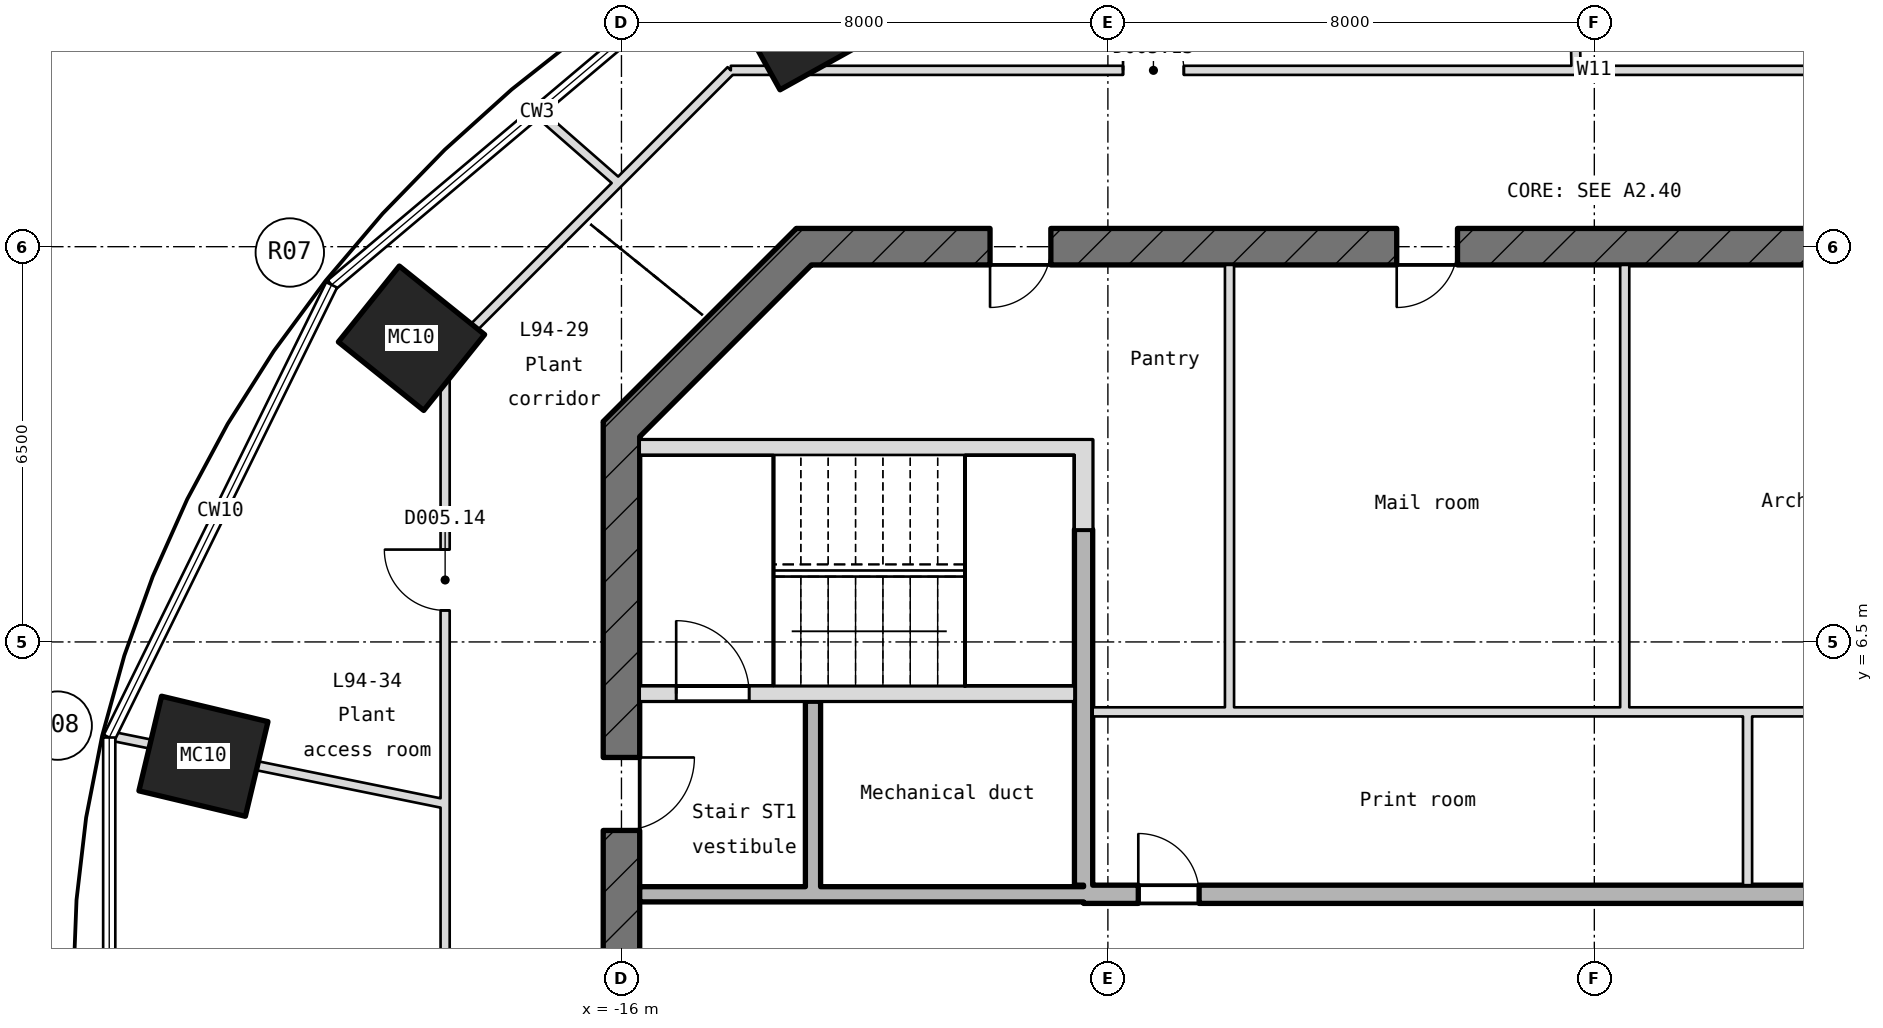
"""IFC4 building model, lengths in metres.
Left out: names, types, materials, properties, quantities, classifications, styles, units other than length and angle.
Written with IfcOpenShell. Run it as: python <this file> out.ifc"""

import sys

from ifc_helpers import new_model, si_unit, direction, frame, frame_2d, origin, origin_2d, place, context, subcontext, project, spatial, rectangle, hollow_rectangle, extrude, element, fill, save


model = new_model("IFC4")
c1 = context("Model", 3, precision=1e-05, world=origin(), true_north=direction((0.0, 1.0)))
c2 = subcontext(c1, "Body", "Model", "MODEL_VIEW")
j1 = project(units=[si_unit("LENGTHUNIT", "METRE"), si_unit("PLANEANGLEUNIT", "RADIAN")], contexts=[c1])
p1 = place(None, origin())
s1 = spatial("IfcSite", under=j1, at=p1, CompositionType="ELEMENT")
p2 = place(p1, origin())
s2 = spatial("IfcBuilding", under=s1, at=p2, CompositionType="ELEMENT")
p3 = place(p2, frame((0.0, 0.0, 418.55)))
s3 = spatial("IfcBuildingStorey", under=s2, at=p3, CompositionType="ELEMENT", Elevation=418.55)
for number, where, z_axis, x_axis in (
    (1, (-13.131, 16.755, -0.2), (0.0, 0.0, 1.0), (0.874, 0.486, 0.0)),
    (2, (-19.453, 11.494, -0.2), (0.0, 0.0, 1.0), (0.626, 0.78, 0.0)),
    (3, (-22.875, 4.62, -0.2), (0.0, 0.0, 1.0), (0.232, 0.973, 0.0)),
):
    element("IfcColumn", number, at=place(p3, frame(where, z_axis=z_axis, x_axis=x_axis)), inside=s3, PredefinedType="COLUMN", context=c2, shape_type="SweptSolid", body=[
        extrude(hollow_rectangle(XDim=1.6, YDim=1.8, WallThickness=0.045, at=origin_2d()), origin(), (0.0, 0.0, 1.0), 4.9),
    ])
p4 = place(p3, frame((13.124, 13.0, -0.2), z_axis=(0.0, 0.0, 1.0), x_axis=(-1.0, 0.0, 0.0)))
e4 = element("IfcWall", 4, at=p4, inside=s3, PredefinedType="SHEAR", context=c2, shape_type="SweptSolid", body=[
    extrude(rectangle(XDim=26.249, YDim=0.6, at=frame_2d((13.124, 0.0))), origin(), (0.0, 0.0, 1.0), 4.9),
])
p5 = place(p4, frame((22.062, 0.0, 0.2)))
e5 = element("IfcOpeningElement", 5, at=p5, cuts=e4, PredefinedType="OPENING", context=c2, shape_type="SweptSolid", body=[
    extrude(rectangle(XDim=1.0, YDim=2.1, at=frame_2d((0.5, 1.05))), frame((0.0, 0.31, 0.0), z_axis=(0.0, -1.0, 0.0), x_axis=(1.0, 0.0, 0.0)), (0.0, 0.0, 1.0), 0.62),
])
p6 = place(p4, frame((15.374, 0.0, 0.2)))
e6 = element("IfcOpeningElement", 6, at=p6, cuts=e4, PredefinedType="OPENING", context=c2, shape_type="SweptSolid", body=[
    extrude(rectangle(XDim=1.0, YDim=2.1, at=frame_2d((0.5, 1.05))), frame((0.0, 0.31, 0.0), z_axis=(0.0, -1.0, 0.0), x_axis=(1.0, 0.0, 0.0)), (0.0, 0.0, 1.0), 0.62),
])
p7 = place(p4, frame((7.874, 0.0, 0.2)))
e7 = element("IfcOpeningElement", 7, at=p7, cuts=e4, PredefinedType="OPENING", context=c2, shape_type="SweptSolid", body=[
    extrude(rectangle(XDim=1.0, YDim=2.1, at=frame_2d((0.5, 1.05))), frame((0.0, 0.31, 0.0), z_axis=(0.0, -1.0, 0.0), x_axis=(1.0, 0.0, 0.0)), (0.0, 0.0, 1.0), 0.62),
])
p8 = place(p4, frame((2.4, 0.0, 0.2)))
e8 = element("IfcOpeningElement", 8, at=p8, cuts=e4, PredefinedType="OPENING", context=c2, shape_type="SweptSolid", body=[
    extrude(rectangle(XDim=1.0, YDim=2.1, at=frame_2d((0.5, 1.05))), frame((0.0, 0.31, 0.0), z_axis=(0.0, -1.0, 0.0), x_axis=(1.0, 0.0, 0.0)), (0.0, 0.0, 1.0), 0.62),
])
p9 = place(p3, frame((-12.912, 13.088, -0.2), z_axis=(0.0, 0.0, 1.0), x_axis=(-0.707106781187, -0.707106781187, 0.0)))
e9 = element("IfcWall", 9, at=p9, inside=s3, PredefinedType="SHEAR", context=c2, shape_type="SweptSolid", body=[
    extrude(rectangle(XDim=4.491, YDim=0.6, at=frame_2d((2.246, 0.0))), origin(), (0.0, 0.0, 1.0), 4.9),
])
p10 = place(p3, frame((-16.0, 10.124, -0.2), z_axis=(0.0, 0.0, 1.0), x_axis=(0.0, -1.0, 0.0)))
e10 = element("IfcWall", 10, at=p10, inside=s3, PredefinedType="SHEAR", context=c2, shape_type="SweptSolid", body=[
    extrude(rectangle(XDim=20.249, YDim=0.6, at=frame_2d((10.124, 0.0))), origin(), (0.0, 0.0, 1.0), 4.9),
])
p11 = place(p10, frame((8.924, 0.0, 0.2)))
e11 = element("IfcOpeningElement", 11, at=p11, cuts=e10, PredefinedType="OPENING", context=c2, shape_type="SweptSolid", body=[
    extrude(rectangle(XDim=2.4, YDim=2.1, at=frame_2d((1.2, 1.05))), frame((0.0, 0.31, 0.0), z_axis=(0.0, -1.0, 0.0), x_axis=(1.0, 0.0, 0.0)), (0.0, 0.0, 1.0), 0.62),
])
p12 = place(p10, frame((5.524, 0.0, 0.2)))
e12 = element("IfcOpeningElement", 12, at=p12, cuts=e10, PredefinedType="OPENING", context=c2, shape_type="SweptSolid", body=[
    extrude(rectangle(XDim=1.2, YDim=2.1, at=frame_2d((0.6, 1.05))), frame((0.0, 0.31, 0.0), z_axis=(0.0, -1.0, 0.0), x_axis=(1.0, 0.0, 0.0)), (0.0, 0.0, 1.0), 0.62),
])
p13 = place(p3, frame((-15.7, 2.35, 0.0), z_axis=(0.0, 0.0, 1.0), x_axis=(1.0, 0.0, 0.0)))
e13 = element("IfcWall", 13, at=p13, inside=s3, PredefinedType="STANDARD", context=c2, shape_type="SweptSolid", body=[
    extrude(rectangle(XDim=7.3, YDim=0.25, at=frame_2d((3.65, 0.0))), origin(), (0.0, 0.0, 1.0), 4.7),
])
p14 = place(p3, frame((-8.4, 2.35, -0.2), z_axis=(0.0, 0.0, 1.0), x_axis=(1.0, 0.0, 0.0)))
e14 = element("IfcWall", 14, at=p14, inside=s3, PredefinedType="SHEAR", context=c2, shape_type="SweptSolid", body=[
    extrude(rectangle(XDim=16.8, YDim=0.3, at=frame_2d((8.4, 0.0))), origin(), (0.0, 0.0, 1.0), 4.9),
])
p15 = place(p14, frame((0.9, 0.0, 0.2)))
e15 = element("IfcOpeningElement", 15, at=p15, cuts=e14, PredefinedType="OPENING", context=c2, shape_type="SweptSolid", body=[
    extrude(rectangle(XDim=1.0, YDim=2.1, at=frame_2d((0.5, 1.05))), frame((0.0, 0.16, 0.0), z_axis=(0.0, -1.0, 0.0), x_axis=(1.0, 0.0, 0.0)), (0.0, 0.0, 1.0), 0.32),
])
p16 = place(p14, frame((14.9, 0.0, 0.2)))
e16 = element("IfcOpeningElement", 16, at=p16, cuts=e14, PredefinedType="OPENING", context=c2, shape_type="SweptSolid", body=[
    extrude(rectangle(XDim=1.0, YDim=2.1, at=frame_2d((0.5, 1.05))), frame((0.0, 0.16, 0.0), z_axis=(0.0, -1.0, 0.0), x_axis=(1.0, 0.0, 0.0)), (0.0, 0.0, 1.0), 0.32),
])
p17 = place(p3, frame((-8.25, 5.35, 0.0), z_axis=(0.0, 0.0, 1.0), x_axis=(1.0, 0.0, 0.0)))
e17 = element("IfcWall", 17, at=p17, inside=s3, PredefinedType="PARTITIONING", context=c2, shape_type="SweptSolid", body=[
    extrude(rectangle(XDim=16.5, YDim=0.15, at=frame_2d((8.25, 0.0))), origin(), (0.0, 0.0, 1.0), 4.7),
])
p18 = place(p3, frame((-15.7, 5.65, -0.2), z_axis=(0.0, 0.0, 1.0), x_axis=(1.0, 0.0, 0.0)))
e18 = element("IfcWall", 18, at=p18, inside=s3, PredefinedType="SHEAR", context=c2, shape_type="SweptSolid", body=[
    extrude(rectangle(XDim=7.15, YDim=0.25, at=frame_2d((3.575, 0.0))), origin(), (0.0, 0.0, 1.0), 4.9),
])
p19 = place(p18, frame((0.6, 0.0, 0.2)))
e19 = element("IfcOpeningElement", 19, at=p19, cuts=e18, PredefinedType="OPENING", context=c2, shape_type="SweptSolid", body=[
    extrude(rectangle(XDim=1.2, YDim=2.1, at=frame_2d((0.6, 1.05))), frame((0.0, 0.135, 0.0), z_axis=(0.0, -1.0, 0.0), x_axis=(1.0, 0.0, 0.0)), (0.0, 0.0, 1.0), 0.27),
])
p20 = place(p3, frame((-15.7, 9.7, -0.2), z_axis=(0.0, 0.0, 1.0), x_axis=(1.0, 0.0, 0.0)))
e20 = element("IfcWall", 20, at=p20, inside=s3, PredefinedType="SHEAR", context=c2, shape_type="SweptSolid", body=[
    extrude(rectangle(XDim=7.15, YDim=0.25, at=frame_2d((3.575, 0.0))), origin(), (0.0, 0.0, 1.0), 4.9),
])
p21 = place(p3, frame((-12.85, 2.475, 0.0), z_axis=(0.0, 0.0, 1.0), x_axis=(0.0, 1.0, 0.0)))
e21 = element("IfcWall", 21, at=p21, inside=s3, PredefinedType="STANDARD", context=c2, shape_type="SweptSolid", body=[
    extrude(rectangle(XDim=3.05, YDim=0.25, at=frame_2d((1.525, 0.0))), origin(), (0.0, 0.0, 1.0), 4.7),
])
p22 = place(p3, frame((-8.4, 2.5, -0.2), z_axis=(0.0, 0.0, 1.0), x_axis=(0.0, 1.0, 0.0)))
e22 = element("IfcWall", 22, at=p22, inside=s3, PredefinedType="SHEAR", context=c2, shape_type="SweptSolid", body=[
    extrude(rectangle(XDim=5.85, YDim=0.3, at=frame_2d((2.925, 0.0))), origin(), (0.0, 0.0, 1.0), 4.9),
])
p23 = place(p3, frame((-8.4, 8.35, -0.2), z_axis=(0.0, 0.0, 1.0), x_axis=(0.0, 1.0, 0.0)))
e23 = element("IfcWall", 23, at=p23, inside=s3, PredefinedType="SHEAR", context=c2, shape_type="SweptSolid", body=[
    extrude(rectangle(XDim=1.475, YDim=0.3, at=frame_2d((0.737, 0.0))), origin(), (0.0, 0.0, 1.0), 4.9),
])
for number, where, z_axis, x_axis in (
    (24, (-6.0, 5.425, 0.0), (0.0, 0.0, 1.0), (0.0, 1.0, 0.0)),
    (25, (0.5, 5.425, 0.0), (0.0, 0.0, 1.0), (0.0, 1.0, 0.0)),
):
    element("IfcWall", number, at=place(p3, frame(where, z_axis=z_axis, x_axis=x_axis)), inside=s3, PredefinedType="PARTITIONING", context=c2, shape_type="SweptSolid", body=[
        extrude(rectangle(XDim=7.275, YDim=0.15, at=frame_2d((3.637, 0.0))), origin(), (0.0, 0.0, 1.0), 4.7),
    ])
p24 = place(p3, frame((2.52, 2.5, 0.0), z_axis=(0.0, 0.0, 1.0), x_axis=(0.0, 1.0, 0.0)))
e26 = element("IfcWall", 26, at=p24, inside=s3, PredefinedType="PARTITIONING", context=c2, shape_type="SweptSolid", body=[
    extrude(rectangle(XDim=2.775, YDim=0.15, at=frame_2d((1.387, 0.0))), origin(), (0.0, 0.0, 1.0), 4.7),
])
p25 = place(p3, frame((-14.201, 15.9, 0.0), z_axis=(0.0, 0.0, 1.0), x_axis=(1.0, 0.0, 0.0)))
e27 = element("IfcWall", 27, at=p25, inside=s3, PredefinedType="PARTITIONING", context=c2, shape_type="SweptSolid", body=[
    extrude(rectangle(XDim=28.403, YDim=0.15, at=frame_2d((14.201, 0.0))), origin(), (0.0, 0.0, 1.0), 4.7),
])
p26 = place(p25, frame((20.652, 0.0, 0.0)))
e28 = element("IfcOpeningElement", 28, at=p26, cuts=e27, PredefinedType="OPENING", context=c2, shape_type="SweptSolid", body=[
    extrude(rectangle(XDim=1.0, YDim=2.1, at=frame_2d((0.5, 1.05))), frame((0.0, 0.085, 0.0), z_axis=(0.0, -1.0, 0.0), x_axis=(1.0, 0.0, 0.0)), (0.0, 0.0, 1.0), 0.17),
])
p27 = place(p25, frame((6.45, 0.0, 0.0)))
e29 = element("IfcOpeningElement", 29, at=p27, cuts=e27, PredefinedType="OPENING", context=c2, shape_type="SweptSolid", body=[
    extrude(rectangle(XDim=1.0, YDim=2.1, at=frame_2d((0.5, 1.05))), frame((0.0, 0.085, 0.0), z_axis=(0.0, -1.0, 0.0), x_axis=(1.0, 0.0, 0.0)), (0.0, 0.0, 1.0), 0.17),
])
p28 = place(p3, frame((-18.9, 11.201, 0.0), z_axis=(0.0, 0.0, 1.0), x_axis=(0.707106781187, 0.707106781187, 0.0)))
e30 = element("IfcWall", 30, at=p28, inside=s3, PredefinedType="PARTITIONING", context=c2, shape_type="SweptSolid", body=[
    extrude(rectangle(XDim=3.998, YDim=0.15, at=frame_2d((1.999, 0.0))), origin(), (0.0, 0.0, 1.0), 4.7),
])
p29 = place(p3, frame((-16.073, 14.029, 0.0), z_axis=(0.0, 0.0, 1.0), x_axis=(0.707106781187, 0.707106781187, 0.0)))
e31 = element("IfcWall", 31, at=p29, inside=s3, PredefinedType="PARTITIONING", context=c2, shape_type="SweptSolid", body=[
    extrude(rectangle(XDim=2.646, YDim=0.15, at=frame_2d((1.323, 0.0))), origin(), (0.0, 0.0, 1.0), 4.238),
])
p30 = place(p3, frame((-18.9, -11.201, 0.0), z_axis=(0.0, 0.0, 1.0), x_axis=(0.0, 1.0, 0.0)))
e32 = element("IfcWall", 32, at=p30, inside=s3, PredefinedType="PARTITIONING", context=c2, shape_type="SweptSolid", body=[
    extrude(rectangle(XDim=22.403, YDim=0.15, at=frame_2d((11.201, 0.0))), origin(), (0.0, 0.0, 1.0), 4.7),
])
p31 = place(p30, frame((18.22, 0.0, 0.0)))
e33 = element("IfcOpeningElement", 33, at=p31, cuts=e32, PredefinedType="OPENING", context=c2, shape_type="SweptSolid", body=[
    extrude(rectangle(XDim=1.0, YDim=2.1, at=frame_2d((0.5, 1.05))), frame((0.0, 0.085, 0.0), z_axis=(0.0, -1.0, 0.0), x_axis=(1.0, 0.0, 0.0)), (0.0, 0.0, 1.0), 0.17),
])
p32 = place(p30, frame((7.824, 0.0, 0.0)))
e34 = element("IfcOpeningElement", 34, at=p32, cuts=e32, PredefinedType="OPENING", context=c2, shape_type="SweptSolid", body=[
    extrude(rectangle(XDim=1.0, YDim=2.1, at=frame_2d((0.5, 1.05))), frame((0.0, 0.085, 0.0), z_axis=(0.0, -1.0, 0.0), x_axis=(1.0, 0.0, 0.0)), (0.0, 0.0, 1.0), 0.17),
])
p33 = place(p3, frame((-0.301, 15.9, 0.0), z_axis=(0.0, 0.0, 1.0), x_axis=(-0.018863287148, 0.99982207237, 0.0)))
e35 = element("IfcWall", 35, at=p33, inside=s3, PredefinedType="PARTITIONING", context=c2, shape_type="SweptSolid", body=[
    extrude(rectangle(XDim=3.598, YDim=0.15, at=frame_2d((1.799, 0.0))), origin(), (0.0, 0.0, 1.0), 4.347),
])
p34 = place(p3, frame((-16.051, 14.05, 0.0), z_axis=(0.0, 0.0, 1.0), x_axis=(-0.75245614782, 0.658642350299, 0.0)))
e36 = element("IfcWall", 36, at=p34, inside=s3, PredefinedType="PARTITIONING", context=c2, shape_type="SweptSolid", body=[
    extrude(rectangle(XDim=1.757, YDim=0.15, at=frame_2d((0.878, 0.0))), origin(), (0.0, 0.0, 1.0), 4.7),
])
p35 = place(p3, frame((-18.9, 3.837, 0.0), z_axis=(0.0, 0.0, 1.0), x_axis=(-0.980010753304, 0.198944523445, 0.0)))
e37 = element("IfcWall", 37, at=p35, inside=s3, PredefinedType="PARTITIONING", context=c2, shape_type="SweptSolid", body=[
    extrude(rectangle(XDim=3.651, YDim=0.15, at=frame_2d((1.825, 0.0))), origin(), (0.0, 0.0, 1.0), 4.283),
])
p36 = place(p3, frame((-22.478, 4.563, 0.0), z_axis=(0.0, 0.0, 1.0), x_axis=(-0.980028469709, 0.198857231602, 0.0)))
e38 = element("IfcWall", 38, at=p36, inside=s3, PredefinedType="PARTITIONING", context=c2, shape_type="SweptSolid", body=[
    extrude(rectangle(XDim=1.952, YDim=0.15, at=frame_2d((0.976, 0.0))), origin(), (0.0, 0.0, 1.0), 4.7),
])
p37 = place(p19, origin())
e39 = element("IfcDoor", 39, at=p37, inside=s3, OperationType="SINGLE_SWING_RIGHT", PredefinedType="DOOR", context=c2, shape_type="SweptSolid", body=[
    extrude(rectangle(XDim=1.2, YDim=2.1, at=frame_2d((0.6, 1.05))), frame((0.0, 0.025, 0.0), z_axis=(0.0, -1.0, 0.0), x_axis=(1.0, 0.0, 0.0)), (0.0, 0.0, 1.0), 0.05),
])
fill(e19, e39)
p38 = place(p12, origin())
e40 = element("IfcDoor", 40, at=p38, inside=s3, OperationType="SINGLE_SWING_RIGHT", PredefinedType="DOOR", context=c2, shape_type="SweptSolid", body=[
    extrude(rectangle(XDim=1.2, YDim=2.1, at=frame_2d((0.6, 1.05))), frame((0.0, 0.025, 0.0), z_axis=(0.0, -1.0, 0.0), x_axis=(1.0, 0.0, 0.0)), (0.0, 0.0, 1.0), 0.05),
])
fill(e12, e40)
p39 = place(p15, origin())
e41 = element("IfcDoor", 41, at=p39, inside=s3, OperationType="SINGLE_SWING_RIGHT", PredefinedType="DOOR", context=c2, shape_type="SweptSolid", body=[
    extrude(rectangle(XDim=1.0, YDim=2.1, at=frame_2d((0.5, 1.05))), frame((0.0, 0.025, 0.0), z_axis=(0.0, -1.0, 0.0), x_axis=(1.0, 0.0, 0.0)), (0.0, 0.0, 1.0), 0.05),
])
fill(e15, e41)
p40 = place(p5, origin())
e42 = element("IfcDoor", 42, at=p40, inside=s3, OperationType="SINGLE_SWING_RIGHT", PredefinedType="DOOR", context=c2, shape_type="SweptSolid", body=[
    extrude(rectangle(XDim=1.0, YDim=2.1, at=frame_2d((0.5, 1.05))), frame((0.0, 0.025, 0.0), z_axis=(0.0, -1.0, 0.0), x_axis=(1.0, 0.0, 0.0)), (0.0, 0.0, 1.0), 0.05),
])
fill(e5, e42)
p41 = place(p6, origin())
e43 = element("IfcDoor", 43, at=p41, inside=s3, OperationType="SINGLE_SWING_RIGHT", PredefinedType="DOOR", context=c2, shape_type="SweptSolid", body=[
    extrude(rectangle(XDim=1.0, YDim=2.1, at=frame_2d((0.5, 1.05))), frame((0.0, 0.025, 0.0), z_axis=(0.0, -1.0, 0.0), x_axis=(1.0, 0.0, 0.0)), (0.0, 0.0, 1.0), 0.05),
])
fill(e6, e43)
p42 = place(p27, origin())
e44 = element("IfcDoor", 44, at=p42, inside=s3, OperationType="SINGLE_SWING_RIGHT", PredefinedType="DOOR", context=c2, shape_type="SweptSolid", body=[
    extrude(rectangle(XDim=1.0, YDim=2.1, at=frame_2d((0.5, 1.05))), frame((0.0, 0.025, 0.0), z_axis=(0.0, -1.0, 0.0), x_axis=(1.0, 0.0, 0.0)), (0.0, 0.0, 1.0), 0.05),
])
fill(e29, e44)
p43 = place(p31, origin())
e45 = element("IfcDoor", 45, at=p43, inside=s3, OperationType="SINGLE_SWING_RIGHT", PredefinedType="DOOR", context=c2, shape_type="SweptSolid", body=[
    extrude(rectangle(XDim=1.0, YDim=2.1, at=frame_2d((0.5, 1.05))), frame((0.0, 0.025, 0.0), z_axis=(0.0, -1.0, 0.0), x_axis=(1.0, 0.0, 0.0)), (0.0, 0.0, 1.0), 0.05),
])
fill(e33, e45)
save(model, sys.argv[1])
